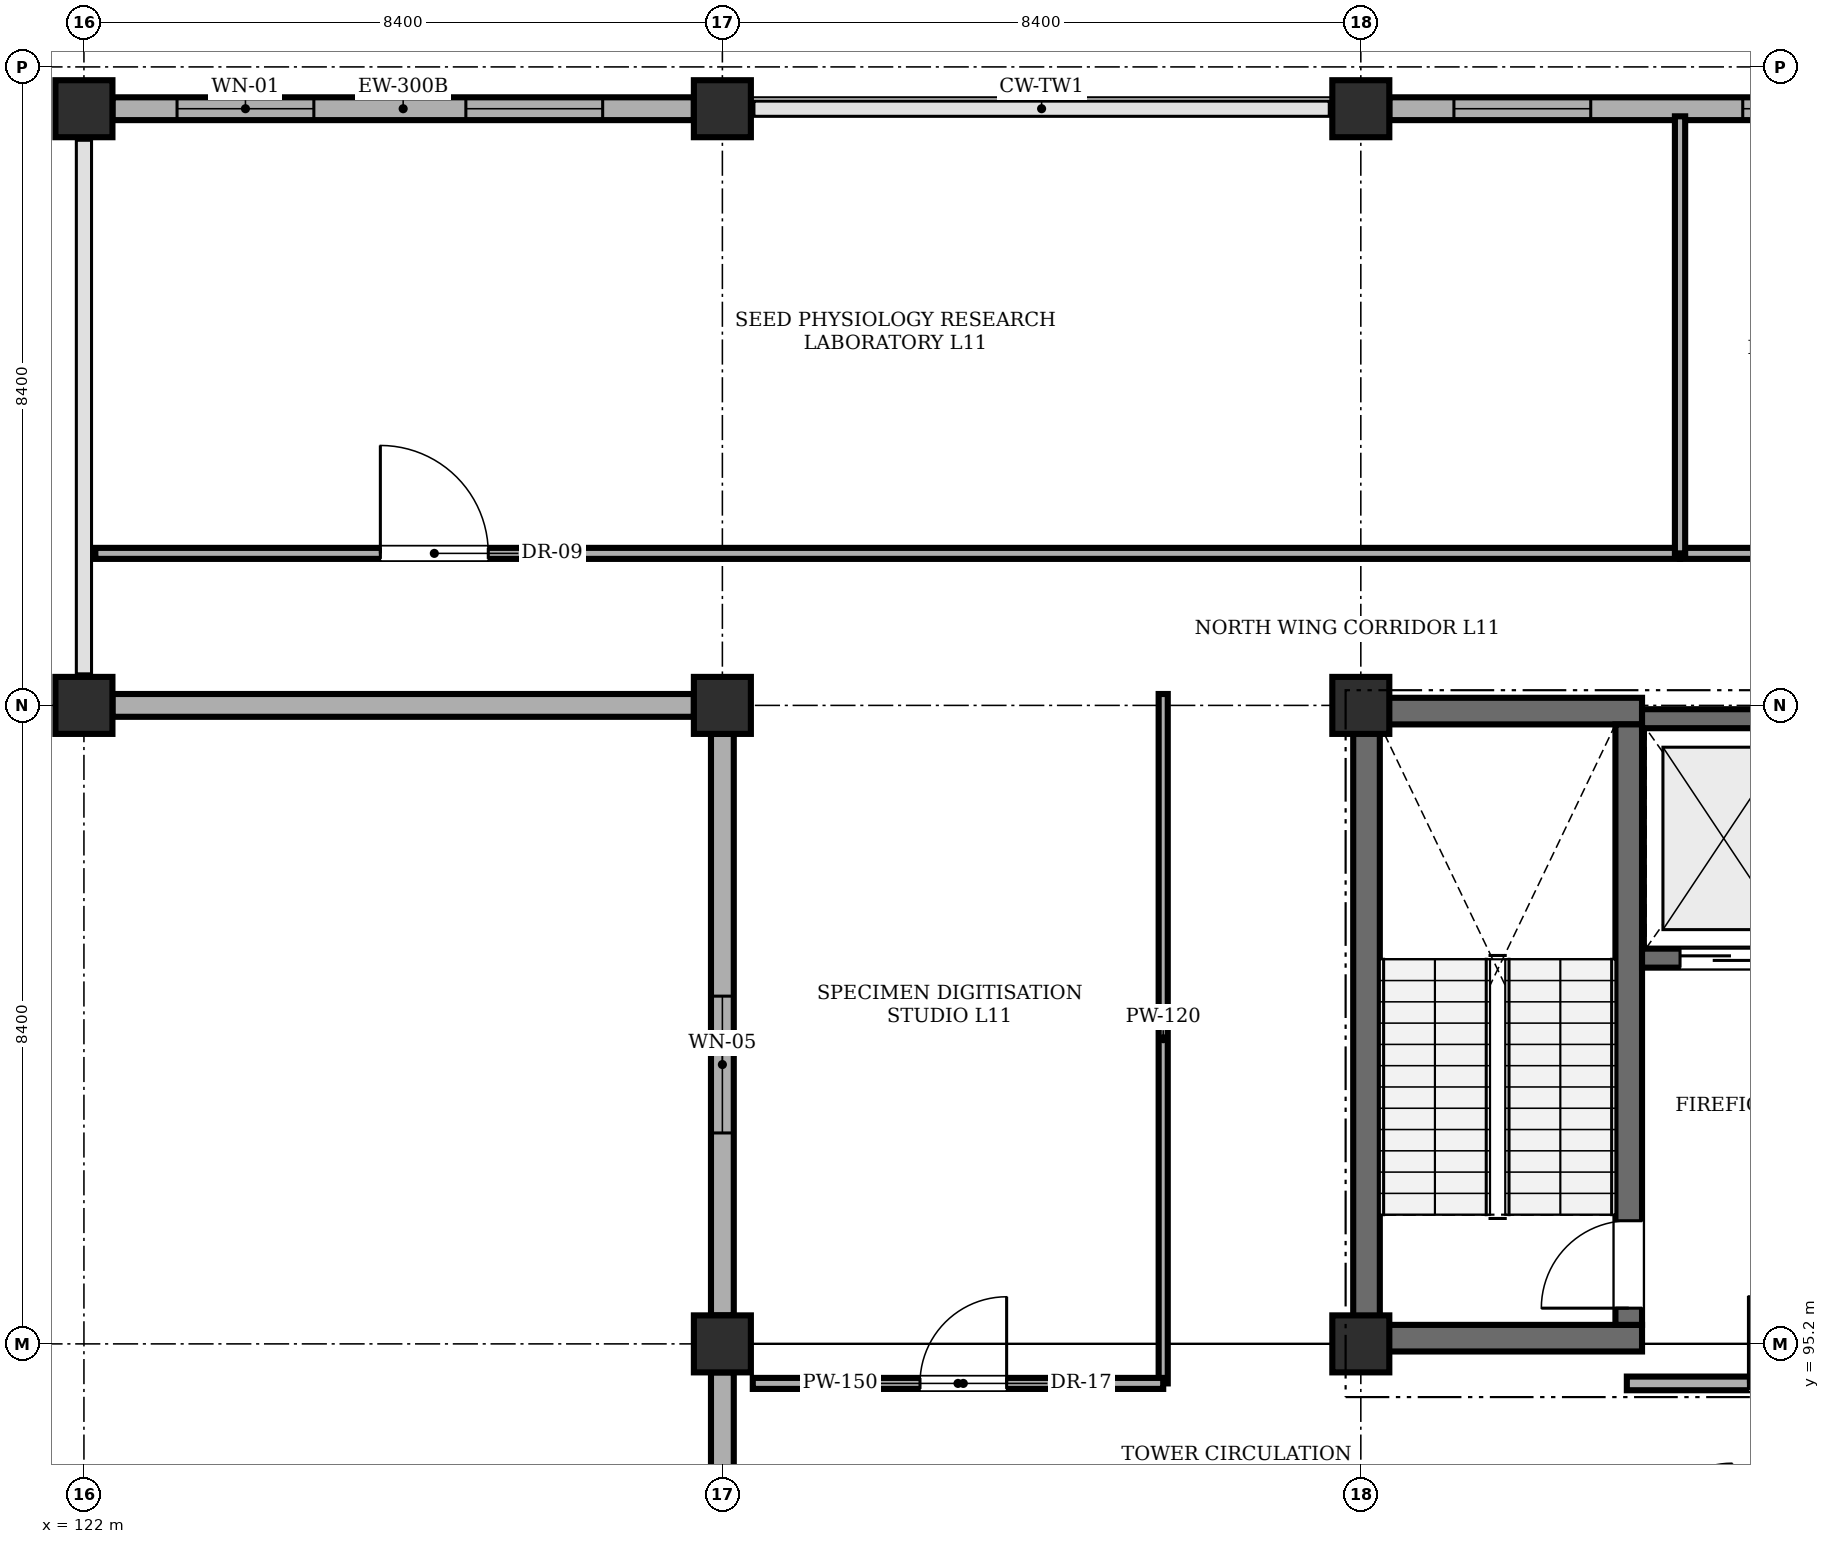
"""IFC4 building model, lengths in metres.
Left out: names, types, materials, properties, quantities, classifications, styles, units other than length and angle.
Written with IfcOpenShell. Run it as: python <this file> out.ifc"""

import sys

from ifc_helpers import new_model, si_unit, direction, frame, frame_2d, origin, origin_2d, place, context, subcontext, project, spatial, rectangle, extrude, element, fill, save


model = new_model("IFC4")
c1 = context("Model", 3, precision=1e-05, world=origin(), true_north=direction((0.0, 1.0)))
c2 = subcontext(c1, "Body", "Model", "MODEL_VIEW")
j1 = project(units=[si_unit("LENGTHUNIT", "METRE"), si_unit("PLANEANGLEUNIT", "RADIAN")], contexts=[c1])
p1 = place(None, origin())
s1 = spatial("IfcSite", under=j1, at=p1, CompositionType="ELEMENT")
p2 = place(p1, origin())
s2 = spatial("IfcBuilding", under=s1, at=p2, CompositionType="ELEMENT")
p3 = place(p2, frame((0.0, 0.0, 44.4)))
s3 = spatial("IfcBuildingStorey", under=s2, at=p3, CompositionType="ELEMENT", Elevation=44.4)
for number, where, z_axis, x_axis in (
    (1, (122.0, 103.6, 0.0), (0.0, 0.0, 1.0), (1.0, 0.0, 0.0)),
    (2, (122.0, 111.45, 0.0), (0.0, 0.0, 1.0), (1.0, 0.0, 0.0)),
    (3, (130.4, 95.2, 0.0), (0.0, 0.0, 1.0), (1.0, 0.0, 0.0)),
    (4, (130.4, 103.6, 0.0), (0.0, 0.0, 1.0), (1.0, 0.0, 0.0)),
    (5, (130.4, 111.45, 0.0), (0.0, 0.0, 1.0), (1.0, 0.0, 0.0)),
    (6, (138.8, 95.2, 0.0), (0.0, 0.0, 1.0), (1.0, 0.0, 0.0)),
    (7, (138.8, 103.6, 0.0), (0.0, 0.0, 1.0), (1.0, 0.0, 0.0)),
    (8, (138.8, 111.45, 0.0), (0.0, 0.0, 1.0), (1.0, 0.0, 0.0)),
):
    element("IfcColumn", number, at=place(p3, frame(where, z_axis=z_axis, x_axis=x_axis)), inside=s3, PredefinedType="COLUMN", context=c2, shape_type="SweptSolid", body=[
        extrude(rectangle(XDim=0.75, YDim=0.75, at=origin_2d()), origin(), (0.0, 0.0, 1.0), 4.01),
    ])
for number, where, z_axis, x_axis in (
    (9, (138.7, 95.275, 0.0), (0.0, 0.0, 1.0), (1.0, 0.0, 0.0)),
    (10, (138.7, 103.525, 0.0), (0.0, 0.0, 1.0), (1.0, 0.0, 0.0)),
):
    element("IfcWall", number, at=place(p3, frame(where, z_axis=z_axis, x_axis=x_axis)), inside=s3, PredefinedType="SHEAR", context=c2, shape_type="SweptSolid", body=[
        extrude(rectangle(XDim=3.8, YDim=0.35, at=frame_2d((1.9, 0.0))), origin(), (0.0, 0.0, 1.0), 4.01),
    ])
p4 = place(p3, frame((138.875, 95.45, 0.0), z_axis=(0.0, 0.0, 1.0), x_axis=(0.0, 1.0, 0.0)))
e11 = element("IfcWall", 11, at=p4, inside=s3, PredefinedType="SHEAR", context=c2, shape_type="SweptSolid", body=[
    extrude(rectangle(XDim=7.9, YDim=0.35, at=frame_2d((3.95, 0.0))), origin(), (0.0, 0.0, 1.0), 4.01),
])
p5 = place(p3, frame((142.325, 95.45, 0.0), z_axis=(0.0, 0.0, 1.0), x_axis=(0.0, 1.0, 0.0)))
e12 = element("IfcWall", 12, at=p5, inside=s3, PredefinedType="SHEAR", context=c2, shape_type="SweptSolid", body=[
    extrude(rectangle(XDim=7.9, YDim=0.35, at=frame_2d((3.95, 0.0))), origin(), (0.0, 0.0, 1.0), 4.01),
])
p6 = place(p5, frame((0.22, 0.0, 0.0)))
e13 = element("IfcOpeningElement", 13, at=p6, cuts=e12, PredefinedType="OPENING", context=c2, shape_type="SweptSolid", body=[
    extrude(rectangle(XDim=1.15, YDim=2.15, at=frame_2d((0.575, 1.075))), frame((0.0, 0.185, 0.0), z_axis=(0.0, -1.0, 0.0), x_axis=(1.0, 0.0, 0.0)), (0.0, 0.0, 1.0), 0.37),
])
p7 = place(p3, frame((142.5, 100.275, 0.0), z_axis=(0.0, 0.0, 1.0), x_axis=(1.0, 0.0, 0.0)))
e14 = element("IfcWall", 14, at=p7, inside=s3, PredefinedType="SHEAR", context=c2, shape_type="SweptSolid", body=[
    extrude(rectangle(XDim=2.1, YDim=0.25, at=frame_2d((1.05, 0.0))), origin(), (0.0, 0.0, 1.0), 4.01),
])
p8 = place(p7, frame((0.5, 0.0, 0.0)))
e15 = element("IfcOpeningElement", 15, at=p8, cuts=e14, PredefinedType="OPENING", context=c2, shape_type="SweptSolid", body=[
    extrude(rectangle(XDim=1.1, YDim=2.15, at=frame_2d((0.55, 1.075))), frame((0.0, 0.135, 0.0), z_axis=(0.0, -1.0, 0.0), x_axis=(1.0, 0.0, 0.0)), (0.0, 0.0, 1.0), 0.27),
])
p9 = place(p3, frame((142.5, 103.425, 0.0), z_axis=(0.0, 0.0, 1.0), x_axis=(1.0, 0.0, 0.0)))
e16 = element("IfcWall", 16, at=p9, inside=s3, PredefinedType="SHEAR", context=c2, shape_type="SweptSolid", body=[
    extrude(rectangle(XDim=2.1, YDim=0.25, at=frame_2d((1.05, 0.0))), origin(), (0.0, 0.0, 1.0), 4.01),
])
p10 = place(p3, frame((122.375, 111.45, 0.0), z_axis=(0.0, 0.0, 1.0), x_axis=(1.0, 0.0, 0.0)))
e17 = element("IfcWall", 17, at=p10, inside=s3, PredefinedType="STANDARD", context=c2, shape_type="SweptSolid", body=[
    extrude(rectangle(XDim=7.65, YDim=0.3, at=frame_2d((3.825, 0.0))), origin(), (0.0, 0.0, 1.0), 3.31),
])
p11 = place(p10, frame((0.85, 0.0, 0.9)))
e18 = element("IfcOpeningElement", 18, at=p11, cuts=e17, PredefinedType="OPENING", context=c2, shape_type="SweptSolid", body=[
    extrude(rectangle(XDim=1.8, YDim=2.1, at=frame_2d((0.9, 1.05))), frame((0.0, 0.16, 0.0), z_axis=(0.0, -1.0, 0.0), x_axis=(1.0, 0.0, 0.0)), (0.0, 0.0, 1.0), 0.32),
])
p12 = place(p10, frame((4.65, 0.0, 0.9)))
e19 = element("IfcOpeningElement", 19, at=p12, cuts=e17, PredefinedType="OPENING", context=c2, shape_type="SweptSolid", body=[
    extrude(rectangle(XDim=1.8, YDim=2.1, at=frame_2d((0.9, 1.05))), frame((0.0, 0.16, 0.0), z_axis=(0.0, -1.0, 0.0), x_axis=(1.0, 0.0, 0.0)), (0.0, 0.0, 1.0), 0.32),
])
p13 = place(p3, frame((139.175, 111.45, 0.0), z_axis=(0.0, 0.0, 1.0), x_axis=(1.0, 0.0, 0.0)))
e20 = element("IfcWall", 20, at=p13, inside=s3, PredefinedType="STANDARD", context=c2, shape_type="SweptSolid", body=[
    extrude(rectangle(XDim=7.65, YDim=0.3, at=frame_2d((3.825, 0.0))), origin(), (0.0, 0.0, 1.0), 3.31),
])
p14 = place(p13, frame((0.85, 0.0, 0.9)))
e21 = element("IfcOpeningElement", 21, at=p14, cuts=e20, PredefinedType="OPENING", context=c2, shape_type="SweptSolid", body=[
    extrude(rectangle(XDim=1.8, YDim=2.1, at=frame_2d((0.9, 1.05))), frame((0.0, 0.16, 0.0), z_axis=(0.0, -1.0, 0.0), x_axis=(1.0, 0.0, 0.0)), (0.0, 0.0, 1.0), 0.32),
])
p15 = place(p13, frame((4.65, 0.0, 0.9)))
e22 = element("IfcOpeningElement", 22, at=p15, cuts=e20, PredefinedType="OPENING", context=c2, shape_type="SweptSolid", body=[
    extrude(rectangle(XDim=1.8, YDim=2.1, at=frame_2d((0.9, 1.05))), frame((0.0, 0.16, 0.0), z_axis=(0.0, -1.0, 0.0), x_axis=(1.0, 0.0, 0.0)), (0.0, 0.0, 1.0), 0.32),
])
p16 = place(p3, frame((130.4, 92.15, 0.0), z_axis=(0.0, 0.0, 1.0), x_axis=(0.0, 1.0, 0.0)))
e23 = element("IfcWall", 23, at=p16, inside=s3, PredefinedType="STANDARD", context=c2, shape_type="SweptSolid", body=[
    extrude(rectangle(XDim=2.675, YDim=0.3, at=frame_2d((1.337, 0.0))), origin(), (0.0, 0.0, 1.0), 4.01),
])
p17 = place(p3, frame((130.4, 95.575, 0.0), z_axis=(0.0, 0.0, 1.0), x_axis=(0.0, 1.0, 0.0)))
e24 = element("IfcWall", 24, at=p17, inside=s3, PredefinedType="STANDARD", context=c2, shape_type="SweptSolid", body=[
    extrude(rectangle(XDim=7.65, YDim=0.3, at=frame_2d((3.825, 0.0))), origin(), (0.0, 0.0, 1.0), 3.31),
])
p18 = place(p17, frame((2.4, 0.0, 1.0)))
e25 = element("IfcOpeningElement", 25, at=p18, cuts=e24, PredefinedType="OPENING", context=c2, shape_type="SweptSolid", body=[
    extrude(rectangle(XDim=1.8, YDim=1.8, at=frame_2d((0.9, 0.9))), frame((0.0, 0.16, 0.0), z_axis=(0.0, -1.0, 0.0), x_axis=(1.0, 0.0, 0.0)), (0.0, 0.0, 1.0), 0.32),
])
p19 = place(p3, frame((130.025, 103.6, 0.0), z_axis=(0.0, 0.0, 1.0), x_axis=(-1.0, 0.0, 0.0)))
e26 = element("IfcWall", 26, at=p19, inside=s3, PredefinedType="STANDARD", context=c2, shape_type="SweptSolid", body=[
    extrude(rectangle(XDim=7.65, YDim=0.3, at=frame_2d((3.825, 0.0))), origin(), (0.0, 0.0, 1.0), 3.31),
])
p20 = place(p3, frame((142.3, 94.68, 0.0), z_axis=(0.0, 0.0, 1.0), x_axis=(1.0, 0.0, 0.0)))
e27 = element("IfcWall", 27, at=p20, inside=s3, PredefinedType="STANDARD", context=c2, shape_type="SweptSolid", body=[
    extrude(rectangle(XDim=4.8, YDim=0.18, at=frame_2d((2.4, 0.0))), origin(), (0.0, 0.0, 1.0), 4.01),
])
p21 = place(p20, frame((1.6, 0.0, 0.0)))
e28 = element("IfcOpeningElement", 28, at=p21, cuts=e27, PredefinedType="OPENING", context=c2, shape_type="SweptSolid", body=[
    extrude(rectangle(XDim=1.15, YDim=2.15, at=frame_2d((0.575, 1.075))), frame((0.0, 0.1, 0.0), z_axis=(0.0, -1.0, 0.0), x_axis=(1.0, 0.0, 0.0)), (0.0, 0.0, 1.0), 0.2),
])
p22 = place(p3, frame((136.2, 94.68, 0.0), z_axis=(0.0, 0.0, 1.0), x_axis=(0.0, 1.0, 0.0)))
e29 = element("IfcWall", 29, at=p22, inside=s3, PredefinedType="PARTITIONING", context=c2, shape_type="SweptSolid", body=[
    extrude(rectangle(XDim=9.07, YDim=0.12, at=frame_2d((4.535, 0.0))), origin(), (0.0, 0.0, 1.0), 4.01),
])
p23 = place(p3, frame((130.8, 94.68, 0.0), z_axis=(0.0, 0.0, 1.0), x_axis=(1.0, 0.0, 0.0)))
e30 = element("IfcWall", 30, at=p23, inside=s3, PredefinedType="PARTITIONING", context=c2, shape_type="SweptSolid", body=[
    extrude(rectangle(XDim=5.4, YDim=0.145, at=frame_2d((2.7, 0.0))), origin(), (0.0, 0.0, 1.0), 4.01),
])
p24 = place(p23, frame((2.2, 0.0, 0.0)))
e31 = element("IfcOpeningElement", 31, at=p24, cuts=e30, PredefinedType="OPENING", context=c2, shape_type="SweptSolid", body=[
    extrude(rectangle(XDim=1.14, YDim=2.18, at=frame_2d((0.57, 1.09))), frame((0.0, 0.083, 0.0), z_axis=(0.0, -1.0, 0.0), x_axis=(1.0, 0.0, 0.0)), (0.0, 0.0, 1.0), 0.165),
])
p25 = place(p3, frame((122.15, 105.6, 0.0), z_axis=(0.0, 0.0, 1.0), x_axis=(1.0, 0.0, 0.0)))
e32 = element("IfcWall", 32, at=p25, inside=s3, PredefinedType="PARTITIONING", context=c2, shape_type="SweptSolid", body=[
    extrude(rectangle(XDim=20.85, YDim=0.145, at=frame_2d((10.425, 0.0))), origin(), (0.0, 0.0, 1.0), 4.01),
])
p26 = place(p25, frame((3.75, 0.0, 0.0)))
e33 = element("IfcOpeningElement", 33, at=p26, cuts=e32, PredefinedType="OPENING", context=c2, shape_type="SweptSolid", body=[
    extrude(rectangle(XDim=1.42, YDim=2.22, at=frame_2d((0.71, 1.11))), frame((0.0, 0.083, 0.0), z_axis=(0.0, -1.0, 0.0), x_axis=(1.0, 0.0, 0.0)), (0.0, 0.0, 1.0), 0.165),
])
p27 = place(p3, frame((143.0, 105.6, 0.0), z_axis=(0.0, 0.0, 1.0), x_axis=(1.0, 0.0, 0.0)))
e34 = element("IfcWall", 34, at=p27, inside=s3, PredefinedType="PARTITIONING", context=c2, shape_type="SweptSolid", body=[
    extrude(rectangle(XDim=20.35, YDim=0.145, at=frame_2d((10.175, 0.0))), origin(), (0.0, 0.0, 1.0), 4.01),
])
p28 = place(p27, frame((6.8, 0.0, 0.0)))
e35 = element("IfcOpeningElement", 35, at=p28, cuts=e34, PredefinedType="OPENING", context=c2, shape_type="SweptSolid", body=[
    extrude(rectangle(XDim=1.42, YDim=2.22, at=frame_2d((0.71, 1.11))), frame((0.0, 0.083, 0.0), z_axis=(0.0, -1.0, 0.0), x_axis=(1.0, 0.0, 0.0)), (0.0, 0.0, 1.0), 0.165),
])
p29 = place(p3, frame((143.0, 105.6, 0.0), z_axis=(0.0, 0.0, 1.0), x_axis=(0.0, 1.0, 0.0)))
e36 = element("IfcWall", 36, at=p29, inside=s3, PredefinedType="PARTITIONING", context=c2, shape_type="SweptSolid", body=[
    extrude(rectangle(XDim=5.75, YDim=0.135, at=frame_2d((2.875, 0.0))), origin(), (0.0, 0.0, 1.0), 3.56),
])
p30 = place(p11, origin())
e37 = element("IfcWindow", 37, at=p30, inside=s3, PartitioningType="DOUBLE_PANEL_VERTICAL", PredefinedType="WINDOW", context=c2, shape_type="SweptSolid", body=[
    extrude(rectangle(XDim=1.8, YDim=2.1, at=frame_2d((0.9, 1.05))), frame((0.0, 0.03, 0.0), z_axis=(0.0, -1.0, 0.0), x_axis=(1.0, 0.0, 0.0)), (0.0, 0.0, 1.0), 0.06),
])
fill(e18, e37)
p31 = place(p12, origin())
e38 = element("IfcWindow", 38, at=p31, inside=s3, PartitioningType="DOUBLE_PANEL_VERTICAL", PredefinedType="WINDOW", context=c2, shape_type="SweptSolid", body=[
    extrude(rectangle(XDim=1.8, YDim=2.1, at=frame_2d((0.9, 1.05))), frame((0.0, 0.03, 0.0), z_axis=(0.0, -1.0, 0.0), x_axis=(1.0, 0.0, 0.0)), (0.0, 0.0, 1.0), 0.06),
])
fill(e19, e38)
p32 = place(p14, origin())
e39 = element("IfcWindow", 39, at=p32, inside=s3, PartitioningType="DOUBLE_PANEL_VERTICAL", PredefinedType="WINDOW", context=c2, shape_type="SweptSolid", body=[
    extrude(rectangle(XDim=1.8, YDim=2.1, at=frame_2d((0.9, 1.05))), frame((0.0, 0.03, 0.0), z_axis=(0.0, -1.0, 0.0), x_axis=(1.0, 0.0, 0.0)), (0.0, 0.0, 1.0), 0.06),
])
fill(e21, e39)
p33 = place(p15, origin())
e40 = element("IfcWindow", 40, at=p33, inside=s3, PartitioningType="DOUBLE_PANEL_VERTICAL", PredefinedType="WINDOW", context=c2, shape_type="SweptSolid", body=[
    extrude(rectangle(XDim=1.8, YDim=2.1, at=frame_2d((0.9, 1.05))), frame((0.0, 0.03, 0.0), z_axis=(0.0, -1.0, 0.0), x_axis=(1.0, 0.0, 0.0)), (0.0, 0.0, 1.0), 0.06),
])
fill(e22, e40)
p34 = place(p18, origin())
e41 = element("IfcWindow", 41, at=p34, inside=s3, PartitioningType="DOUBLE_PANEL_VERTICAL", PredefinedType="WINDOW", context=c2, shape_type="SweptSolid", body=[
    extrude(rectangle(XDim=1.8, YDim=1.8, at=frame_2d((0.9, 0.9))), frame((0.0, 0.03, 0.0), z_axis=(0.0, -1.0, 0.0), x_axis=(1.0, 0.0, 0.0)), (0.0, 0.0, 1.0), 0.06),
])
fill(e25, e41)
p35 = place(p21, origin())
e42 = element("IfcDoor", 42, at=p35, inside=s3, OperationType="SINGLE_SWING_LEFT", PredefinedType="DOOR", context=c2, shape_type="SweptSolid", body=[
    extrude(rectangle(XDim=1.15, YDim=2.15, at=frame_2d((0.575, 1.075))), frame((0.0, 0.025, 0.0), z_axis=(0.0, -1.0, 0.0), x_axis=(1.0, 0.0, 0.0)), (0.0, 0.0, 1.0), 0.05),
])
fill(e28, e42)
p36 = place(p24, origin())
e43 = element("IfcDoor", 43, at=p36, inside=s3, OperationType="SINGLE_SWING_RIGHT", PredefinedType="DOOR", context=c2, shape_type="SweptSolid", body=[
    extrude(rectangle(XDim=1.14, YDim=2.18, at=frame_2d((0.57, 1.09))), frame((0.0, 0.025, 0.0), z_axis=(0.0, -1.0, 0.0), x_axis=(1.0, 0.0, 0.0)), (0.0, 0.0, 1.0), 0.05),
])
fill(e31, e43)
p37 = place(p26, origin())
e44 = element("IfcDoor", 44, at=p37, inside=s3, OperationType="SINGLE_SWING_LEFT", PredefinedType="DOOR", context=c2, shape_type="SweptSolid", body=[
    extrude(rectangle(XDim=1.42, YDim=2.22, at=frame_2d((0.71, 1.11))), frame((0.0, 0.025, 0.0), z_axis=(0.0, -1.0, 0.0), x_axis=(1.0, 0.0, 0.0)), (0.0, 0.0, 1.0), 0.05),
])
fill(e33, e44)
p38 = place(p6, origin())
e45 = element("IfcDoor", 45, at=p38, inside=s3, OperationType="SINGLE_SWING_LEFT", PredefinedType="DOOR", context=c2, shape_type="SweptSolid", body=[
    extrude(rectangle(XDim=1.15, YDim=2.15, at=frame_2d((0.575, 1.075))), frame((0.0, 0.025, 0.0), z_axis=(0.0, -1.0, 0.0), x_axis=(1.0, 0.0, 0.0)), (0.0, 0.0, 1.0), 0.05),
])
fill(e13, e45)
p39 = place(p8, origin())
e46 = element("IfcDoor", 46, at=p39, inside=s3, OperationType="SLIDING_TO_LEFT", PredefinedType="DOOR", context=c2, shape_type="SweptSolid", body=[
    extrude(rectangle(XDim=1.1, YDim=2.15, at=frame_2d((0.55, 1.075))), frame((0.0, 0.025, 0.0), z_axis=(0.0, -1.0, 0.0), x_axis=(1.0, 0.0, 0.0)), (0.0, 0.0, 1.0), 0.05),
])
fill(e15, e46)
save(model, sys.argv[1])
